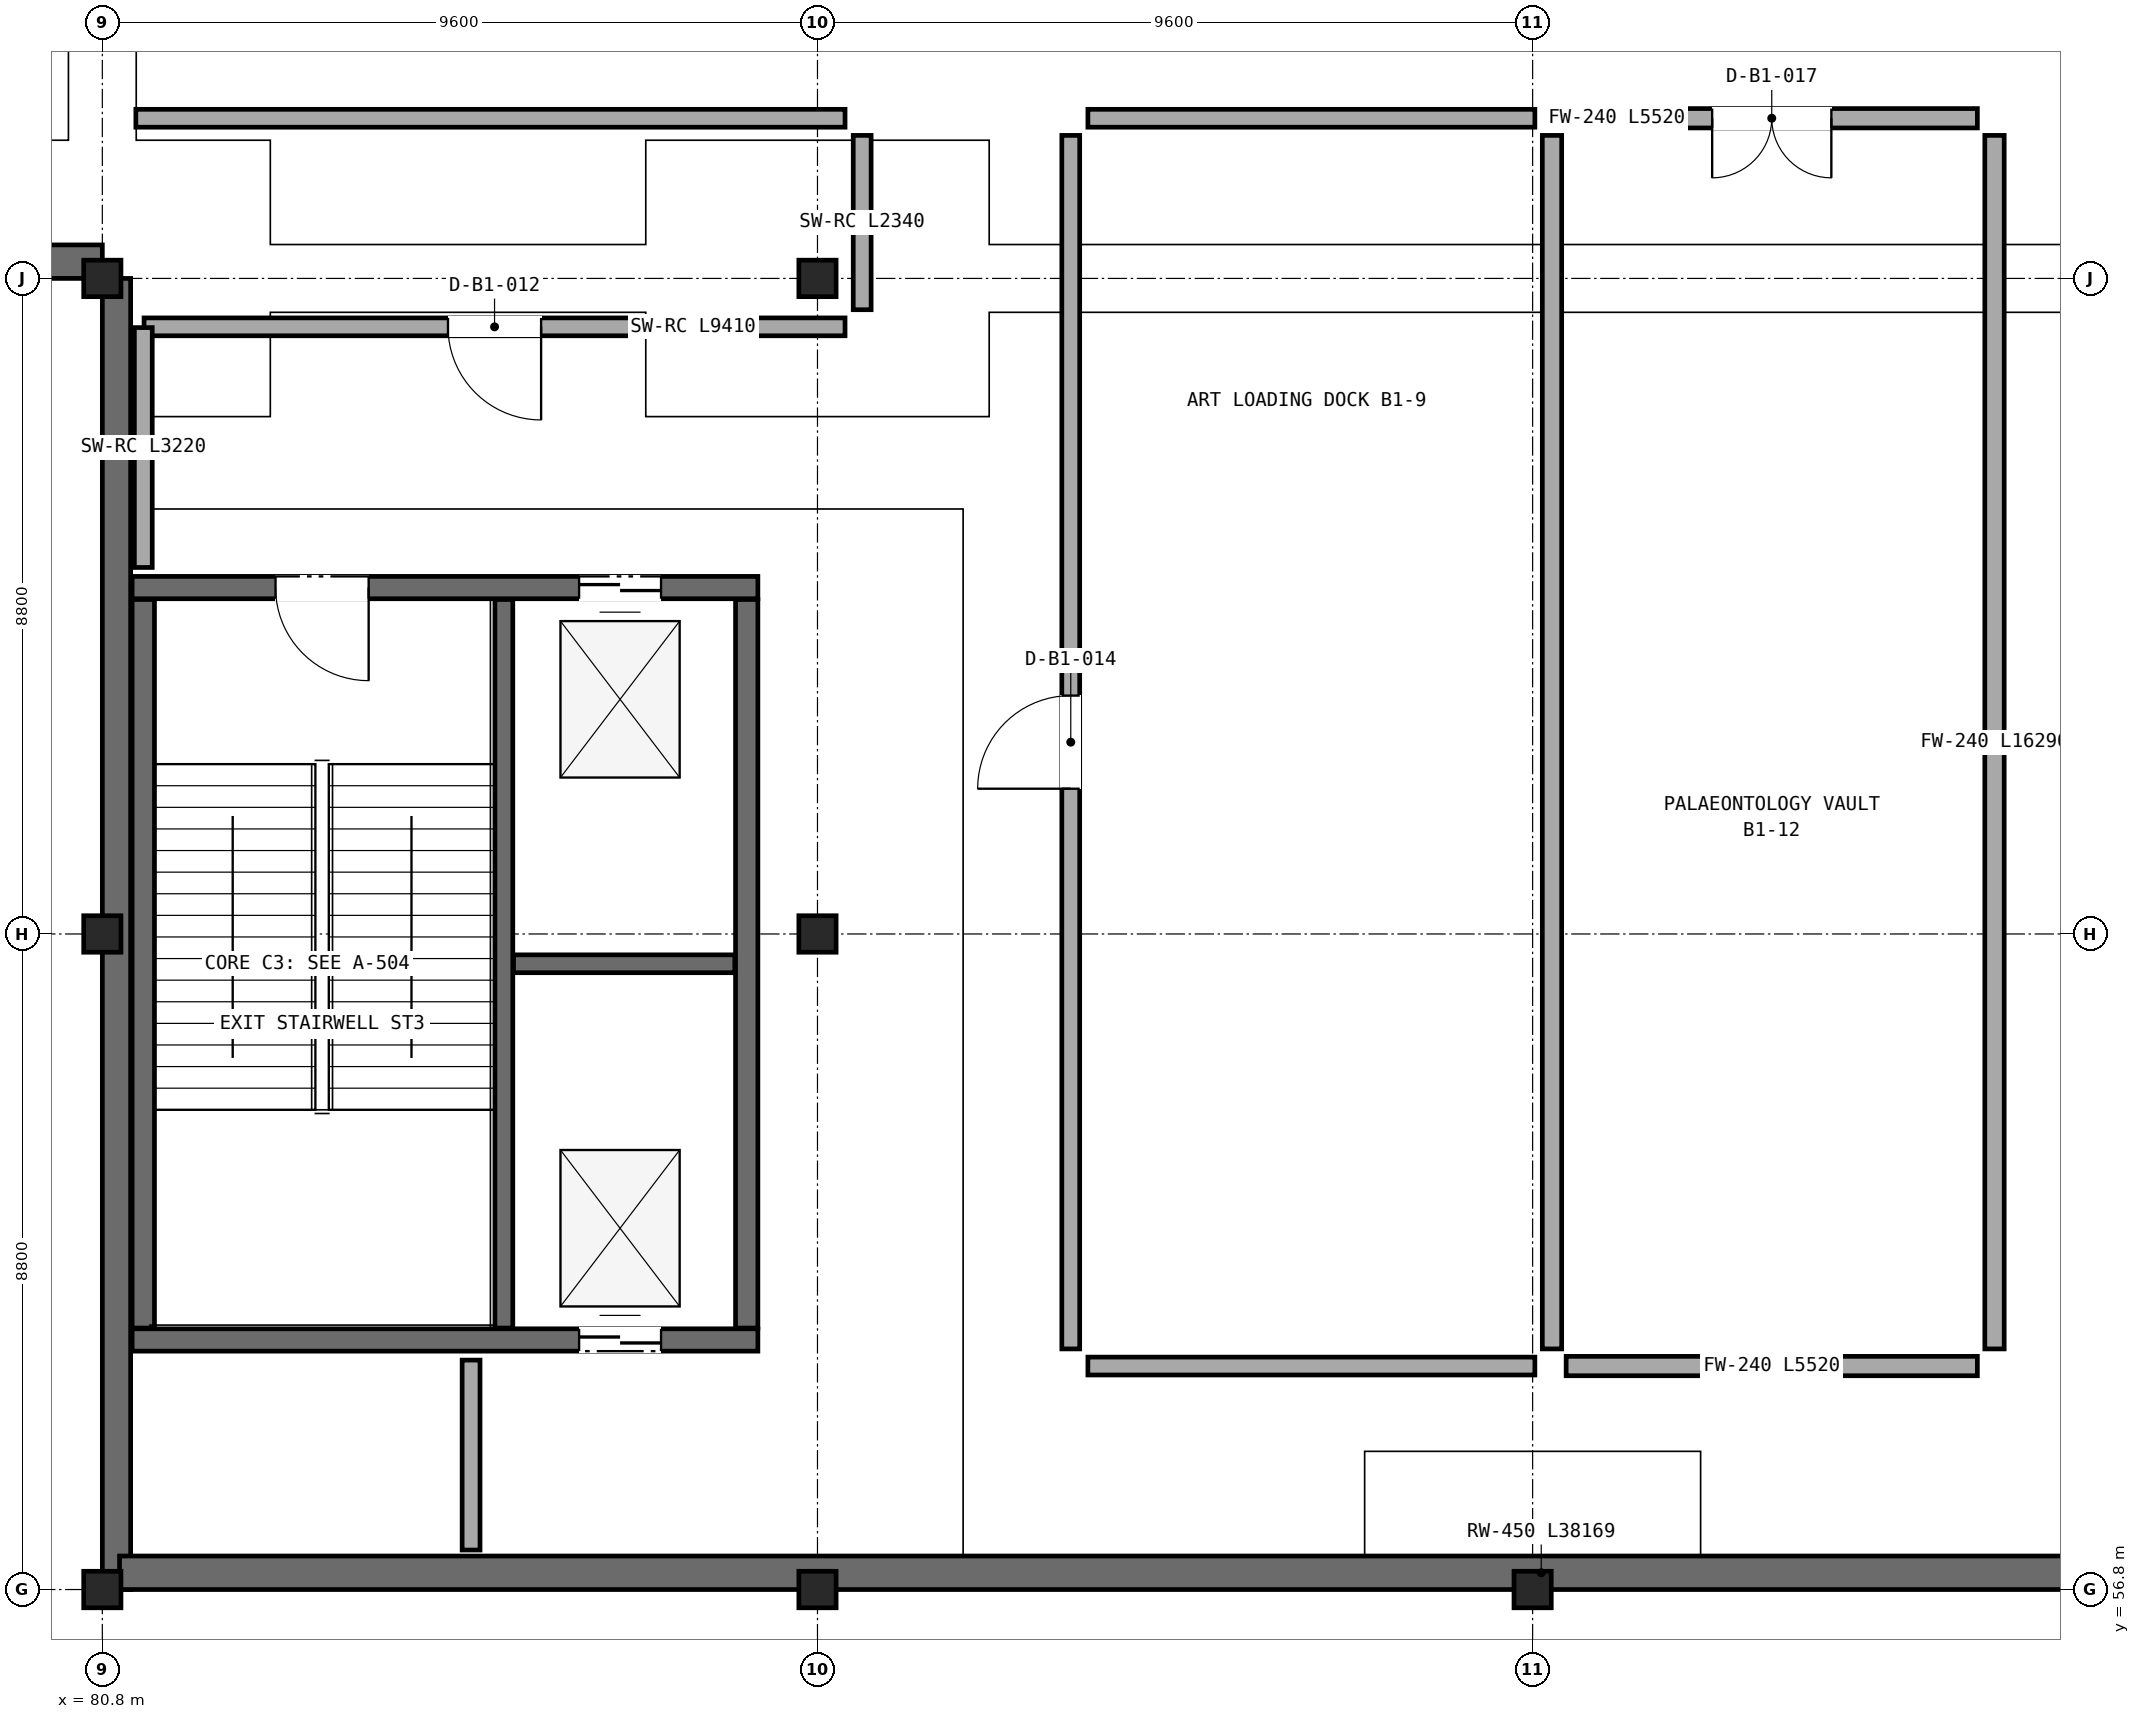
"""IFC4 building model, lengths in metres.
Left out: names, types, materials, properties, quantities, classifications, styles, units other than length and angle.
Written with IfcOpenShell. Run it as: python <this file> out.ifc"""

import sys

from ifc_helpers import new_model, si_unit, direction, frame, frame_2d, origin, origin_2d, place, context, subcontext, project, spatial, rectangle, i_section, extrude, element, fill, save


model = new_model("IFC4")
c1 = context("Model", 3, precision=1e-05, world=origin(), true_north=direction((0.0, 1.0)))
c2 = subcontext(c1, "Body", "Model", "MODEL_VIEW")
j1 = project(units=[si_unit("LENGTHUNIT", "METRE"), si_unit("PLANEANGLEUNIT", "RADIAN")], contexts=[c1])
p1 = place(None, origin())
s1 = spatial("IfcSite", under=j1, at=p1, CompositionType="ELEMENT")
p2 = place(p1, origin())
s2 = spatial("IfcBuilding", under=s1, at=p2, CompositionType="ELEMENT")
p3 = place(p2, frame((0.0, 0.0, -5.4)))
s3 = spatial("IfcBuildingStorey", under=s2, at=p3, CompositionType="ELEMENT", Elevation=-5.4)
for number, where, z_axis, x_axis in (
    (1, (90.4, 56.8, 0.0), (0.0, 0.0, 1.0), (1.0, 0.0, 0.0)),
    (2, (90.4, 65.6, 0.0), (0.0, 0.0, 1.0), (1.0, 0.0, 0.0)),
    (3, (90.4, 74.4, 0.0), (0.0, 0.0, 1.0), (1.0, 0.0, 0.0)),
    (4, (100.0, 56.8, 0.0), (0.0, 0.0, 1.0), (1.0, 0.0, 0.0)),
    (5, (80.8, 56.8, 0.0), (0.0, 0.0, 1.0), (1.0, 0.0, 0.0)),
    (6, (80.8, 65.6, 0.0), (0.0, 0.0, 1.0), (1.0, 0.0, 0.0)),
    (7, (80.8, 74.4, 0.0), (0.0, 0.0, 1.0), (1.0, 0.0, 0.0)),
):
    element("IfcColumn", number, at=place(p3, frame(where, z_axis=z_axis, x_axis=x_axis)), inside=s3, PredefinedType="COLUMN", context=c2, shape_type="SweptSolid", body=[
        extrude(i_section(OverallWidth=0.5, OverallDepth=0.49, WebThickness=0.028, FlangeThickness=0.04, at=origin_2d()), origin(), (0.0, 0.0, 1.0), 5.4),
    ])
p4 = place(p3, frame((42.4, 74.625, 0.0), z_axis=(0.0, 0.0, 1.0), x_axis=(1.0, 0.0, 0.0)))
e8 = element("IfcWall", 8, at=p4, inside=s3, PredefinedType="USERDEFINED", context=c2, shape_type="SweptSolid", body=[
    extrude(rectangle(XDim=38.4, YDim=0.45, at=frame_2d((19.2, 0.0))), origin(), (0.0, 0.0, 1.0), 5.06),
])
p5 = place(p3, frame((80.99, 74.4, 0.0), z_axis=(0.0, 0.0, 1.0), x_axis=(0.0, -1.0, 0.0)))
e9 = element("IfcWall", 9, at=p5, inside=s3, PredefinedType="USERDEFINED", context=c2, shape_type="SweptSolid", body=[
    extrude(rectangle(XDim=17.6, YDim=0.38, at=frame_2d((8.8, 0.0))), origin(), (0.0, 0.0, 1.0), 5.06),
])
p6 = place(p3, frame((81.031, 57.025, 0.0), z_axis=(0.0, 0.0, 1.0), x_axis=(1.0, 0.0, 0.0)))
e10 = element("IfcWall", 10, at=p6, inside=s3, PredefinedType="USERDEFINED", context=c2, shape_type="SweptSolid", body=[
    extrude(rectangle(XDim=38.169, YDim=0.45, at=frame_2d((19.084, 0.0))), origin(), (0.0, 0.0, 1.0), 5.06),
])
p7 = place(p3, frame((81.2, 60.15, 0.0), z_axis=(0.0, 0.0, 1.0), x_axis=(1.0, 0.0, 0.0)))
e11 = element("IfcWall", 11, at=p7, inside=s3, PredefinedType="SHEAR", context=c2, shape_type="SweptSolid", body=[
    extrude(rectangle(XDim=8.4, YDim=0.3, at=frame_2d((4.2, 0.0))), origin(), (0.0, 0.0, 1.0), 5.095),
])
p8 = place(p7, frame((6.0, 0.0, 0.0)))
e12 = element("IfcOpeningElement", 12, at=p8, cuts=e11, PredefinedType="OPENING", context=c2, shape_type="SweptSolid", body=[
    extrude(rectangle(XDim=1.1, YDim=2.2, at=frame_2d((0.55, 1.1))), frame((0.0, 0.16, 0.0), z_axis=(0.0, -1.0, 0.0), x_axis=(1.0, 0.0, 0.0)), (0.0, 0.0, 1.0), 0.32),
])
p9 = place(p3, frame((89.6, 70.25, 0.0), z_axis=(0.0, 0.0, 1.0), x_axis=(-1.0, 0.0, 0.0)))
e13 = element("IfcWall", 13, at=p9, inside=s3, PredefinedType="SHEAR", context=c2, shape_type="SweptSolid", body=[
    extrude(rectangle(XDim=8.4, YDim=0.3, at=frame_2d((4.2, 0.0))), origin(), (0.0, 0.0, 1.0), 5.095),
])
p10 = place(p9, frame((5.225, 0.0, 0.0)))
e14 = element("IfcOpeningElement", 14, at=p10, cuts=e13, PredefinedType="OPENING", context=c2, shape_type="SweptSolid", body=[
    extrude(rectangle(XDim=1.25, YDim=2.2, at=frame_2d((0.625, 1.1))), frame((0.0, 0.16, 0.0), z_axis=(0.0, -1.0, 0.0), x_axis=(1.0, 0.0, 0.0)), (0.0, 0.0, 1.0), 0.32),
])
p11 = place(p9, frame((1.3, 0.0, 0.0)))
e15 = element("IfcOpeningElement", 15, at=p11, cuts=e13, PredefinedType="OPENING", context=c2, shape_type="SweptSolid", body=[
    extrude(rectangle(XDim=1.1, YDim=2.2, at=frame_2d((0.55, 1.1))), frame((0.0, 0.16, 0.0), z_axis=(0.0, -1.0, 0.0), x_axis=(1.0, 0.0, 0.0)), (0.0, 0.0, 1.0), 0.32),
])
for number, where, z_axis, x_axis in (
    (16, (89.45, 60.31, 0.0), (0.0, 0.0, 1.0), (0.0, 1.0, 0.0)),
    (17, (81.35, 70.09, 0.0), (0.0, 0.0, 1.0), (0.0, -1.0, 0.0)),
):
    element("IfcWall", number, at=place(p3, frame(where, z_axis=z_axis, x_axis=x_axis)), inside=s3, PredefinedType="SHEAR", context=c2, shape_type="SweptSolid", body=[
        extrude(rectangle(XDim=9.78, YDim=0.3, at=frame_2d((4.89, 0.0))), origin(), (0.0, 0.0, 1.0), 5.095),
    ])
p12 = place(p3, frame((86.19, 60.31, 0.0), z_axis=(0.0, 0.0, 1.0), x_axis=(0.0, 1.0, 0.0)))
e18 = element("IfcWall", 18, at=p12, inside=s3, PredefinedType="SOLIDWALL", context=c2, shape_type="SweptSolid", body=[
    extrude(rectangle(XDim=9.78, YDim=0.24, at=frame_2d((4.89, 0.0))), origin(), (0.0, 0.0, 1.0), 5.095),
])
p13 = place(p3, frame((86.32, 65.2, 0.0), z_axis=(0.0, 0.0, 1.0), x_axis=(1.0, 0.0, 0.0)))
e19 = element("IfcWall", 19, at=p13, inside=s3, PredefinedType="SOLIDWALL", context=c2, shape_type="SweptSolid", body=[
    extrude(rectangle(XDim=2.97, YDim=0.24, at=frame_2d((1.485, 0.0))), origin(), (0.0, 0.0, 1.0), 5.095),
])
p14 = place(p3, frame((91.0, 76.32, 0.0), z_axis=(0.0, 0.0, 1.0), x_axis=(0.0, -1.0, 0.0)))
e20 = element("IfcWall", 20, at=p14, inside=s3, PredefinedType="SOLIDWALL", context=c2, shape_type="SweptSolid", body=[
    extrude(rectangle(XDim=2.34, YDim=0.24, at=frame_2d((1.17, 0.0))), origin(), (0.0, 0.0, 1.0), 5.03),
])
p15 = place(p3, frame((90.77, 73.75, 0.0), z_axis=(0.0, 0.0, 1.0), x_axis=(-1.0, 0.0, 0.0)))
e21 = element("IfcWall", 21, at=p15, inside=s3, PredefinedType="SOLIDWALL", context=c2, shape_type="SweptSolid", body=[
    extrude(rectangle(XDim=9.41, YDim=0.24, at=frame_2d((4.705, 0.0))), origin(), (0.0, 0.0, 1.0), 4.537),
])
p16 = place(p15, frame((4.08, 0.0, 0.0)))
e22 = element("IfcOpeningElement", 22, at=p16, cuts=e21, PredefinedType="OPENING", context=c2, shape_type="SweptSolid", body=[
    extrude(rectangle(XDim=1.25, YDim=2.2, at=frame_2d((0.625, 1.1))), frame((0.0, 0.13, 0.0), z_axis=(0.0, -1.0, 0.0), x_axis=(1.0, 0.0, 0.0)), (0.0, 0.0, 1.0), 0.26),
])
p17 = place(p3, frame((81.35, 73.74, 0.0), z_axis=(0.0, 0.0, 1.0), x_axis=(0.0, -1.0, 0.0)))
e23 = element("IfcWall", 23, at=p17, inside=s3, PredefinedType="SOLIDWALL", context=c2, shape_type="SweptSolid", body=[
    extrude(rectangle(XDim=3.22, YDim=0.24, at=frame_2d((1.61, 0.0))), origin(), (0.0, 0.0, 1.0), 5.03),
])
p18 = place(p3, frame((85.75, 59.88, 0.0), z_axis=(0.0, 0.0, 1.0), x_axis=(0.0, -1.0, 0.0)))
e24 = element("IfcWall", 24, at=p18, inside=s3, PredefinedType="SOLIDWALL", context=c2, shape_type="SweptSolid", body=[
    extrude(rectangle(XDim=2.55, YDim=0.24, at=frame_2d((1.275, 0.0))), origin(), (0.0, 0.0, 1.0), 5.03),
])
p19 = place(p3, frame((81.25, 76.55, 0.0), z_axis=(0.0, 0.0, 1.0), x_axis=(1.0, 0.0, 0.0)))
e25 = element("IfcWall", 25, at=p19, inside=s3, PredefinedType="SOLIDWALL", context=c2, shape_type="SweptSolid", body=[
    extrude(rectangle(XDim=9.52, YDim=0.24, at=frame_2d((4.76, 0.0))), origin(), (0.0, 0.0, 1.0), 4.537),
])
p20 = place(p3, frame((93.8, 60.03, 0.0), z_axis=(0.0, 0.0, 1.0), x_axis=(0.0, 1.0, 0.0)))
e26 = element("IfcWall", 26, at=p20, inside=s3, PredefinedType="SOLIDWALL", context=c2, shape_type="SweptSolid", body=[
    extrude(rectangle(XDim=16.29, YDim=0.24, at=frame_2d((8.145, 0.0))), origin(), (0.0, 0.0, 1.0), 5.03),
])
p21 = place(p20, frame((7.52, 0.0, 0.0)))
e27 = element("IfcOpeningElement", 27, at=p21, cuts=e26, PredefinedType="OPENING", context=c2, shape_type="SweptSolid", body=[
    extrude(rectangle(XDim=1.25, YDim=2.2, at=frame_2d((0.625, 1.1))), frame((0.0, 0.13, 0.0), z_axis=(0.0, -1.0, 0.0), x_axis=(1.0, 0.0, 0.0)), (0.0, 0.0, 1.0), 0.26),
])
for number, where, z_axis, x_axis in (
    (28, (94.03, 76.55, 0.0), (0.0, 0.0, 1.0), (1.0, 0.0, 0.0)),
    (29, (100.03, 59.8, 0.0), (0.0, 0.0, 1.0), (-1.0, 0.0, 0.0)),
):
    element("IfcWall", number, at=place(p3, frame(where, z_axis=z_axis, x_axis=x_axis)), inside=s3, PredefinedType="SOLIDWALL", context=c2, shape_type="SweptSolid", body=[
        extrude(rectangle(XDim=6.0, YDim=0.24, at=frame_2d((3.0, 0.0))), origin(), (0.0, 0.0, 1.0), 5.03),
    ])
p22 = place(p3, frame((100.45, 76.55, 0.0), z_axis=(0.0, 0.0, 1.0), x_axis=(1.0, 0.0, 0.0)))
e30 = element("IfcWall", 30, at=p22, inside=s3, PredefinedType="SOLIDWALL", context=c2, shape_type="SweptSolid", body=[
    extrude(rectangle(XDim=5.52, YDim=0.26, at=frame_2d((2.76, 0.0))), origin(), (0.0, 0.0, 1.0), 5.03),
])
p23 = place(p22, frame((1.96, 0.0, 0.0)))
e31 = element("IfcOpeningElement", 31, at=p23, cuts=e30, PredefinedType="OPENING", context=c2, shape_type="SweptSolid", body=[
    extrude(rectangle(XDim=1.6, YDim=2.4, at=frame_2d((0.8, 1.2))), frame((0.0, 0.14, 0.0), z_axis=(0.0, -1.0, 0.0), x_axis=(1.0, 0.0, 0.0)), (0.0, 0.0, 1.0), 0.28),
])
p24 = place(p3, frame((106.2, 76.32, 0.0), z_axis=(0.0, 0.0, 1.0), x_axis=(0.0, -1.0, 0.0)))
e32 = element("IfcWall", 32, at=p24, inside=s3, PredefinedType="SOLIDWALL", context=c2, shape_type="SweptSolid", body=[
    extrude(rectangle(XDim=16.29, YDim=0.26, at=frame_2d((8.145, 0.0))), origin(), (0.0, 0.0, 1.0), 5.03),
])
p25 = place(p3, frame((105.97, 59.8, 0.0), z_axis=(0.0, 0.0, 1.0), x_axis=(-1.0, 0.0, 0.0)))
e33 = element("IfcWall", 33, at=p25, inside=s3, PredefinedType="SOLIDWALL", context=c2, shape_type="SweptSolid", body=[
    extrude(rectangle(XDim=5.52, YDim=0.26, at=frame_2d((2.76, 0.0))), origin(), (0.0, 0.0, 1.0), 5.03),
])
p26 = place(p3, frame((100.26, 76.32, 0.0), z_axis=(0.0, 0.0, 1.0), x_axis=(0.0, -1.0, 0.0)))
e34 = element("IfcWall", 34, at=p26, inside=s3, PredefinedType="SOLIDWALL", context=c2, shape_type="SweptSolid", body=[
    extrude(rectangle(XDim=16.29, YDim=0.26, at=frame_2d((8.145, 0.0))), origin(), (0.0, 0.0, 1.0), 5.03),
])
p27 = place(p10, origin())
e35 = element("IfcDoor", 35, at=p27, inside=s3, OperationType="SINGLE_SWING_LEFT", PredefinedType="DOOR", context=c2, shape_type="SweptSolid", body=[
    extrude(rectangle(XDim=1.25, YDim=2.2, at=frame_2d((0.625, 1.1))), frame((0.0, 0.025, 0.0), z_axis=(0.0, -1.0, 0.0), x_axis=(1.0, 0.0, 0.0)), (0.0, 0.0, 1.0), 0.05),
])
fill(e14, e35)
p28 = place(p8, origin())
e36 = element("IfcDoor", 36, at=p28, inside=s3, OperationType="DOUBLE_DOOR_SLIDING", PredefinedType="DOOR", context=c2, shape_type="SweptSolid", body=[
    extrude(rectangle(XDim=1.1, YDim=2.2, at=frame_2d((0.55, 1.1))), frame((0.0, 0.025, 0.0), z_axis=(0.0, -1.0, 0.0), x_axis=(1.0, 0.0, 0.0)), (0.0, 0.0, 1.0), 0.05),
])
fill(e12, e36)
p29 = place(p11, origin())
e37 = element("IfcDoor", 37, at=p29, inside=s3, OperationType="DOUBLE_DOOR_SLIDING", PredefinedType="DOOR", context=c2, shape_type="SweptSolid", body=[
    extrude(rectangle(XDim=1.1, YDim=2.2, at=frame_2d((0.55, 1.1))), frame((0.0, 0.025, 0.0), z_axis=(0.0, -1.0, 0.0), x_axis=(1.0, 0.0, 0.0)), (0.0, 0.0, 1.0), 0.05),
])
fill(e15, e37)
p30 = place(p16, origin())
e38 = element("IfcDoor", 38, at=p30, inside=s3, OperationType="SINGLE_SWING_LEFT", PredefinedType="DOOR", context=c2, shape_type="SweptSolid", body=[
    extrude(rectangle(XDim=1.25, YDim=2.2, at=frame_2d((0.625, 1.1))), frame((0.0, 0.025, 0.0), z_axis=(0.0, -1.0, 0.0), x_axis=(1.0, 0.0, 0.0)), (0.0, 0.0, 1.0), 0.05),
])
fill(e22, e38)
p31 = place(p21, origin())
e39 = element("IfcDoor", 39, at=p31, inside=s3, OperationType="SINGLE_SWING_LEFT", PredefinedType="DOOR", context=c2, shape_type="SweptSolid", body=[
    extrude(rectangle(XDim=1.25, YDim=2.2, at=frame_2d((0.625, 1.1))), frame((0.0, 0.025, 0.0), z_axis=(0.0, -1.0, 0.0), x_axis=(1.0, 0.0, 0.0)), (0.0, 0.0, 1.0), 0.05),
])
fill(e27, e39)
p32 = place(p23, frame((1.6, 0.0, 0.0), z_axis=(0.0, 0.0, 1.0), x_axis=(-1.0, 0.0, 0.0)))
e40 = element("IfcDoor", 40, at=p32, inside=s3, OperationType="DOUBLE_DOOR_SINGLE_SWING", PredefinedType="DOOR", context=c2, shape_type="SweptSolid", body=[
    extrude(rectangle(XDim=1.6, YDim=2.4, at=frame_2d((0.8, 1.2))), frame((0.0, 0.025, 0.0), z_axis=(0.0, -1.0, 0.0), x_axis=(1.0, 0.0, 0.0)), (0.0, 0.0, 1.0), 0.05),
])
fill(e31, e40)
save(model, sys.argv[1])
